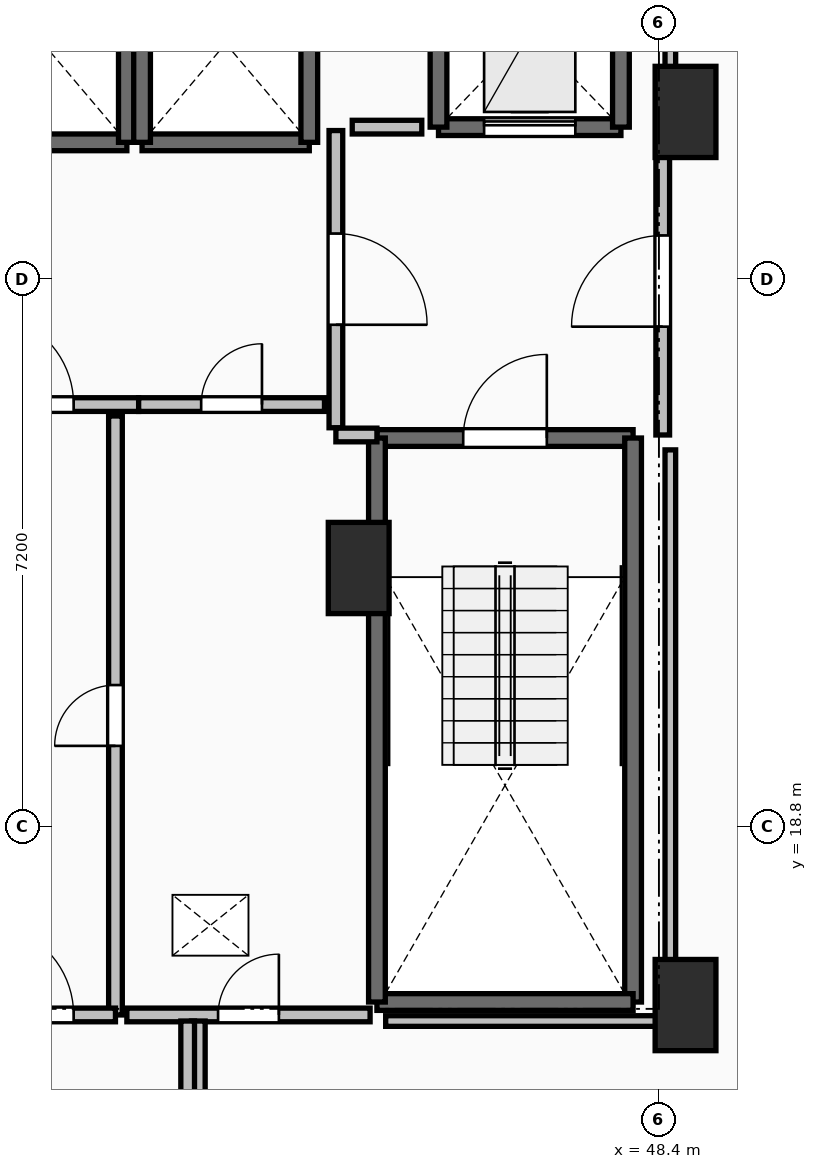
"""IFC4 building model, lengths in metres.
Left out: names, types, materials, properties, quantities, classifications, styles, units other than length and angle.
Written with IfcOpenShell. Run it as: python <this file> out.ifc"""

import sys

from ifc_helpers import new_model, si_unit, direction, frame, frame_2d, origin, origin_2d, place, context, subcontext, project, spatial, rectangle, extrude, element, fill, save


model = new_model("IFC4")
c1 = context("Model", 3, precision=1e-05, world=origin(), true_north=direction((0.0, 1.0)))
c2 = subcontext(c1, "Body", "Model", "MODEL_VIEW")
j1 = project(units=[si_unit("LENGTHUNIT", "METRE"), si_unit("PLANEANGLEUNIT", "RADIAN")], contexts=[c1])
p1 = place(None, origin())
s1 = spatial("IfcSite", under=j1, at=p1, CompositionType="ELEMENT")
p2 = place(p1, origin())
s2 = spatial("IfcBuilding", under=s1, at=p2, CompositionType="ELEMENT")
p3 = place(p2, frame((0.0, 0.0, 117.3)))
s3 = spatial("IfcBuildingStorey", under=s2, at=p3, CompositionType="ELEMENT", Elevation=117.3)
for number, where, z_axis, x_axis in (
    (1, (48.75, 28.2, 0.0), (0.0, 0.0, 1.0), (1.0, 0.0, 0.0)),
    (2, (48.75, 16.45, 0.0), (0.0, 0.0, 1.0), (1.0, 0.0, 0.0)),
    (3, (44.45, 22.2, 0.0), (0.0, 0.0, 1.0), (1.0, 0.0, 0.0)),
):
    element("IfcColumn", number, at=place(p3, frame(where, z_axis=z_axis, x_axis=x_axis)), inside=s3, PredefinedType="PILASTER", context=c2, shape_type="SweptSolid", body=[
        extrude(rectangle(XDim=0.8, YDim=1.2, at=origin_2d()), origin(), (0.0, 0.0, 1.0), 3.5),
    ])
p4 = place(p3, frame((44.69, 23.91, 0.0), z_axis=(0.0, 0.0, 1.0), x_axis=(1.0, 0.0, 0.0)))
e4 = element("IfcWall", 4, at=p4, inside=s3, PredefinedType="SOLIDWALL", context=c2, shape_type="SweptSolid", body=[
    extrude(rectangle(XDim=3.37, YDim=0.22, at=frame_2d((1.685, 0.0))), origin(), (0.0, 0.0, 1.0), 3.24),
])
p5 = place(p4, frame((1.135, 0.0, 0.0)))
e5 = element("IfcOpeningElement", 5, at=p5, cuts=e4, PredefinedType="OPENING", context=c2, shape_type="SweptSolid", body=[
    extrude(rectangle(XDim=1.1, YDim=2.15, at=frame_2d((0.55, 1.075))), frame((0.0, 0.125, 0.0), z_axis=(0.0, -1.0, 0.0), x_axis=(1.0, 0.0, 0.0)), (0.0, 0.0, 1.0), 0.25),
])
p6 = place(p3, frame((48.06, 23.91, 0.0), z_axis=(0.0, 0.0, 1.0), x_axis=(0.0, -1.0, 0.0)))
e6 = element("IfcWall", 6, at=p6, inside=s3, PredefinedType="SOLIDWALL", context=c2, shape_type="SweptSolid", body=[
    extrude(rectangle(XDim=7.42, YDim=0.22, at=frame_2d((3.71, 0.0))), origin(), (0.0, 0.0, 1.0), 3.24),
])
p7 = place(p3, frame((48.06, 16.49, 0.0), z_axis=(0.0, 0.0, 1.0), x_axis=(-1.0, 0.0, 0.0)))
e7 = element("IfcWall", 7, at=p7, inside=s3, PredefinedType="SOLIDWALL", context=c2, shape_type="SweptSolid", body=[
    extrude(rectangle(XDim=3.37, YDim=0.22, at=frame_2d((1.685, 0.0))), origin(), (0.0, 0.0, 1.0), 3.24),
])
p8 = place(p3, frame((44.69, 16.49, 0.0), z_axis=(0.0, 0.0, 1.0), x_axis=(0.0, 1.0, 0.0)))
e8 = element("IfcWall", 8, at=p8, inside=s3, PredefinedType="SOLIDWALL", context=c2, shape_type="SweptSolid", body=[
    extrude(rectangle(XDim=7.42, YDim=0.22, at=frame_2d((3.71, 0.0))), origin(), (0.0, 0.0, 1.0), 3.24),
])
p9 = place(p3, frame((39.2, 27.8, 0.0), z_axis=(0.0, 0.0, 1.0), x_axis=(1.0, 0.0, 0.0)))
e9 = element("IfcWall", 9, at=p9, inside=s3, PredefinedType="SOLIDWALL", context=c2, shape_type="SweptSolid", body=[
    extrude(rectangle(XDim=2.2, YDim=0.22, at=frame_2d((1.1, 0.0))), origin(), (0.0, 0.0, 1.0), 3.24),
])
p10 = place(p3, frame((41.4, 27.8, 0.0), z_axis=(0.0, 0.0, 1.0), x_axis=(0.0, 1.0, 0.0)))
e10 = element("IfcWall", 10, at=p10, inside=s3, PredefinedType="SOLIDWALL", context=c2, shape_type="SweptSolid", body=[
    extrude(rectangle(XDim=2.6, YDim=0.22, at=frame_2d((1.3, 0.0))), origin(), (0.0, 0.0, 1.0), 3.24),
])
p11 = place(p3, frame((41.6, 27.8, 0.0), z_axis=(0.0, 0.0, 1.0), x_axis=(1.0, 0.0, 0.0)))
e11 = element("IfcWall", 11, at=p11, inside=s3, PredefinedType="SOLIDWALL", context=c2, shape_type="SweptSolid", body=[
    extrude(rectangle(XDim=2.2, YDim=0.22, at=frame_2d((1.1, 0.0))), origin(), (0.0, 0.0, 1.0), 3.24),
])
for number, where, z_axis, x_axis in (
    (12, (43.8, 27.8, 0.0), (0.0, 0.0, 1.0), (0.0, 1.0, 0.0)),
    (13, (41.6, 30.4, 0.0), (0.0, 0.0, 1.0), (0.0, -1.0, 0.0)),
):
    element("IfcWall", number, at=place(p3, frame(where, z_axis=z_axis, x_axis=x_axis)), inside=s3, PredefinedType="SOLIDWALL", context=c2, shape_type="SweptSolid", body=[
        extrude(rectangle(XDim=2.6, YDim=0.22, at=frame_2d((1.3, 0.0))), origin(), (0.0, 0.0, 1.0), 3.24),
    ])
p12 = place(p3, frame((45.5, 28.0, 0.0), z_axis=(0.0, 0.0, 1.0), x_axis=(1.0, 0.0, 0.0)))
e14 = element("IfcWall", 14, at=p12, inside=s3, PredefinedType="SHEAR", context=c2, shape_type="SweptSolid", body=[
    extrude(rectangle(XDim=2.4, YDim=0.22, at=frame_2d((1.2, 0.0))), origin(), (0.0, 0.0, 1.0), 3.24),
])
p13 = place(p12, frame((0.6, 0.0, 0.0)))
e15 = element("IfcOpeningElement", 15, at=p13, cuts=e14, PredefinedType="OPENING", context=c2, shape_type="SweptSolid", body=[
    extrude(rectangle(XDim=1.2, YDim=2.2, at=frame_2d((0.6, 1.1))), frame((0.0, 0.125, 0.0), z_axis=(0.0, -1.0, 0.0), x_axis=(1.0, 0.0, 0.0)), (0.0, 0.0, 1.0), 0.25),
])
for number, where, z_axis, x_axis in (
    (16, (47.9, 28.0, 0.0), (0.0, 0.0, 1.0), (0.0, 1.0, 0.0)),
    (17, (45.5, 30.5, 0.0), (0.0, 0.0, 1.0), (0.0, -1.0, 0.0)),
):
    element("IfcWall", number, at=place(p3, frame(where, z_axis=z_axis, x_axis=x_axis)), inside=s3, PredefinedType="SHEAR", context=c2, shape_type="SweptSolid", body=[
        extrude(rectangle(XDim=2.5, YDim=0.22, at=frame_2d((1.25, 0.0))), origin(), (0.0, 0.0, 1.0), 3.24),
    ])
p14 = place(p3, frame((44.15, 27.955, 0.0), z_axis=(0.0, 0.0, 1.0), x_axis=(0.0, -1.0, 0.0)))
e18 = element("IfcWall", 18, at=p14, inside=s3, PredefinedType="PARTITIONING", context=c2, shape_type="SweptSolid", body=[
    extrude(rectangle(XDim=3.91, YDim=0.18, at=frame_2d((1.955, 0.0))), origin(), (0.0, 0.0, 1.0), 3.24),
])
p15 = place(p14, frame((1.355, 0.0, 0.0)))
e19 = element("IfcOpeningElement", 19, at=p15, cuts=e18, PredefinedType="OPENING", context=c2, shape_type="SweptSolid", body=[
    extrude(rectangle(XDim=1.2, YDim=2.15, at=frame_2d((0.6, 1.075))), frame((0.0, 0.105, 0.0), z_axis=(0.0, -1.0, 0.0), x_axis=(1.0, 0.0, 0.0)), (0.0, 0.0, 1.0), 0.21),
])
p16 = place(p3, frame((44.15, 23.95, 0.0), z_axis=(0.0, 0.0, 1.0), x_axis=(1.0, 0.0, 0.0)))
e20 = element("IfcWall", 20, at=p16, inside=s3, PredefinedType="PARTITIONING", context=c2, shape_type="SweptSolid", body=[
    extrude(rectangle(XDim=0.54, YDim=0.18, at=frame_2d((0.27, 0.0))), origin(), (0.0, 0.0, 1.0), 3.24),
])
p17 = place(p3, frame((48.45, 23.95, 0.0), z_axis=(0.0, 0.0, 1.0), x_axis=(0.0, 1.0, 0.0)))
e21 = element("IfcWall", 21, at=p17, inside=s3, PredefinedType="PARTITIONING", context=c2, shape_type="SweptSolid", body=[
    extrude(rectangle(XDim=4.05, YDim=0.18, at=frame_2d((2.025, 0.0))), origin(), (0.0, 0.0, 1.0), 3.24),
])
p18 = place(p17, frame((1.425, 0.0, 0.0)))
e22 = element("IfcOpeningElement", 22, at=p18, cuts=e21, PredefinedType="OPENING", context=c2, shape_type="SweptSolid", body=[
    extrude(rectangle(XDim=1.2, YDim=2.15, at=frame_2d((0.6, 1.075))), frame((0.0, 0.105, 0.0), z_axis=(0.0, -1.0, 0.0), x_axis=(1.0, 0.0, 0.0)), (0.0, 0.0, 1.0), 0.21),
])
p19 = place(p3, frame((38.645, 24.35, 0.0), z_axis=(0.0, 0.0, 1.0), x_axis=(1.0, 0.0, 0.0)))
e23 = element("IfcWall", 23, at=p19, inside=s3, PredefinedType="PARTITIONING", context=c2, shape_type="SweptSolid", body=[
    extrude(rectangle(XDim=2.91, YDim=0.18, at=frame_2d((1.455, 0.0))), origin(), (0.0, 0.0, 1.0), 3.24),
])
p20 = place(p19, frame((0.855, 0.0, 0.0)))
e24 = element("IfcOpeningElement", 24, at=p20, cuts=e23, PredefinedType="OPENING", context=c2, shape_type="SweptSolid", body=[
    extrude(rectangle(XDim=1.2, YDim=2.15, at=frame_2d((0.6, 1.075))), frame((0.0, 0.105, 0.0), z_axis=(0.0, -1.0, 0.0), x_axis=(1.0, 0.0, 0.0)), (0.0, 0.0, 1.0), 0.21),
])
p21 = place(p3, frame((41.555, 24.35, 0.0), z_axis=(0.0, 0.0, 1.0), x_axis=(1.0, 0.0, 0.0)))
e25 = element("IfcWall", 25, at=p21, inside=s3, PredefinedType="PARTITIONING", context=c2, shape_type="SweptSolid", body=[
    extrude(rectangle(XDim=2.445, YDim=0.18, at=frame_2d((1.223, 0.0))), origin(), (0.0, 0.0, 1.0), 3.24),
])
p22 = place(p21, frame((0.823, 0.0, 0.0)))
e26 = element("IfcOpeningElement", 26, at=p22, cuts=e25, PredefinedType="OPENING", context=c2, shape_type="SweptSolid", body=[
    extrude(rectangle(XDim=0.8, YDim=2.05, at=frame_2d((0.4, 1.025))), frame((0.0, 0.105, 0.0), z_axis=(0.0, -1.0, 0.0), x_axis=(1.0, 0.0, 0.0)), (0.0, 0.0, 1.0), 0.21),
])
p23 = place(p3, frame((41.25, 16.32, 0.0), z_axis=(0.0, 0.0, 1.0), x_axis=(0.0, 1.0, 0.0)))
e27 = element("IfcWall", 27, at=p23, inside=s3, PredefinedType="PARTITIONING", context=c2, shape_type="SweptSolid", body=[
    extrude(rectangle(XDim=7.88, YDim=0.18, at=frame_2d((3.94, 0.0))), origin(), (0.0, 0.0, 1.0), 3.24),
])
p24 = place(p23, frame((3.54, 0.0, 0.0)))
e28 = element("IfcOpeningElement", 28, at=p24, cuts=e27, PredefinedType="OPENING", context=c2, shape_type="SweptSolid", body=[
    extrude(rectangle(XDim=0.8, YDim=2.05, at=frame_2d((0.4, 1.025))), frame((0.0, 0.105, 0.0), z_axis=(0.0, -1.0, 0.0), x_axis=(1.0, 0.0, 0.0)), (0.0, 0.0, 1.0), 0.21),
])
p25 = place(p3, frame((38.95, 16.32, 0.0), z_axis=(0.0, 0.0, 1.0), x_axis=(1.0, 0.0, 0.0)))
e29 = element("IfcWall", 29, at=p25, inside=s3, PredefinedType="PARTITIONING", context=c2, shape_type="SweptSolid", body=[
    extrude(rectangle(XDim=2.3, YDim=0.18, at=frame_2d((1.15, 0.0))), origin(), (0.0, 0.0, 1.0), 3.24),
])
p26 = place(p25, frame((0.55, 0.0, 0.0)))
e30 = element("IfcOpeningElement", 30, at=p26, cuts=e29, PredefinedType="OPENING", context=c2, shape_type="SweptSolid", body=[
    extrude(rectangle(XDim=1.2, YDim=2.15, at=frame_2d((0.6, 1.075))), frame((0.0, 0.105, 0.0), z_axis=(0.0, -1.0, 0.0), x_axis=(1.0, 0.0, 0.0)), (0.0, 0.0, 1.0), 0.21),
])
p27 = place(p3, frame((41.4, 16.32, 0.0), z_axis=(0.0, 0.0, 1.0), x_axis=(1.0, 0.0, 0.0)))
e31 = element("IfcWall", 31, at=p27, inside=s3, PredefinedType="PARTITIONING", context=c2, shape_type="SweptSolid", body=[
    extrude(rectangle(XDim=3.2, YDim=0.18, at=frame_2d((1.6, 0.0))), origin(), (0.0, 0.0, 1.0), 3.24),
])
p28 = place(p27, frame((1.2, 0.0, 0.0)))
e32 = element("IfcOpeningElement", 32, at=p28, cuts=e31, PredefinedType="OPENING", context=c2, shape_type="SweptSolid", body=[
    extrude(rectangle(XDim=0.8, YDim=2.05, at=frame_2d((0.4, 1.025))), frame((0.0, 0.105, 0.0), z_axis=(0.0, -1.0, 0.0), x_axis=(1.0, 0.0, 0.0)), (0.0, 0.0, 1.0), 0.21),
])
for number, where, z_axis, x_axis in (
    (33, (42.34, 16.24, 0.0), (0.0, 0.0, 1.0), (0.0, -1.0, 0.0)),
    (34, (42.2, 14.1, 0.0), (0.0, 0.0, 1.0), (0.0, 1.0, 0.0)),
):
    element("IfcWall", number, at=place(p3, frame(where, z_axis=z_axis, x_axis=x_axis)), inside=s3, PredefinedType="PARTITIONING", context=c2, shape_type="SweptSolid", body=[
        extrude(rectangle(XDim=2.14, YDim=0.18, at=frame_2d((1.07, 0.0))), origin(), (0.0, 0.0, 1.0), 2.874),
    ])
p29 = place(p3, frame((45.28, 28.0, 0.0), z_axis=(0.0, 0.0, 1.0), x_axis=(-1.0, 0.0, 0.0)))
e35 = element("IfcWall", 35, at=p29, inside=s3, PredefinedType="PARTITIONING", context=c2, shape_type="SweptSolid", body=[
    extrude(rectangle(XDim=0.915, YDim=0.18, at=frame_2d((0.458, 0.0))), origin(), (0.0, 0.0, 1.0), 3.24),
])
p30 = place(p3, frame((48.55, 33.45, 0.0), z_axis=(0.0, 0.0, 1.0), x_axis=(0.0, -1.0, 0.0)))
e36 = element("IfcWall", 36, at=p30, inside=s3, PredefinedType="PARTITIONING", context=c2, shape_type="SweptSolid", body=[
    extrude(rectangle(XDim=5.254, YDim=0.14, at=frame_2d((2.627, 0.0))), origin(), (0.0, 0.0, 1.0), 2.432),
])
p31 = place(p3, frame((48.55, 23.754, 0.0), z_axis=(0.0, 0.0, 1.0), x_axis=(0.0, -1.0, 0.0)))
e37 = element("IfcWall", 37, at=p31, inside=s3, PredefinedType="PARTITIONING", context=c2, shape_type="SweptSolid", body=[
    extrude(rectangle(XDim=7.514, YDim=0.14, at=frame_2d((3.757, 0.0))), origin(), (0.0, 0.0, 1.0), 2.432),
])
p32 = place(p3, frame((48.55, 16.24, 0.0), z_axis=(0.0, 0.0, 1.0), x_axis=(-1.0, 0.0, 0.0)))
e38 = element("IfcWall", 38, at=p32, inside=s3, PredefinedType="PARTITIONING", context=c2, shape_type="SweptSolid", body=[
    extrude(rectangle(XDim=3.745, YDim=0.14, at=frame_2d((1.873, 0.0))), origin(), (0.0, 0.0, 1.0), 2.432),
])
p33 = place(p5, origin())
e39 = element("IfcDoor", 39, at=p33, inside=s3, OperationType="SINGLE_SWING_RIGHT", PredefinedType="DOOR", context=c2, shape_type="SweptSolid", body=[
    extrude(rectangle(XDim=1.1, YDim=2.15, at=frame_2d((0.55, 1.075))), frame((0.0, 0.025, 0.0), z_axis=(0.0, -1.0, 0.0), x_axis=(1.0, 0.0, 0.0)), (0.0, 0.0, 1.0), 0.05),
])
fill(e5, e39)
p34 = place(p13, origin())
e40 = element("IfcDoor", 40, at=p34, inside=s3, OperationType="SLIDING_TO_LEFT", PredefinedType="DOOR", context=c2, shape_type="SweptSolid", body=[
    extrude(rectangle(XDim=1.2, YDim=2.2, at=frame_2d((0.6, 1.1))), frame((0.0, 0.025, 0.0), z_axis=(0.0, -1.0, 0.0), x_axis=(1.0, 0.0, 0.0)), (0.0, 0.0, 1.0), 0.05),
])
fill(e15, e40)
p35 = place(p15, origin())
e41 = element("IfcDoor", 41, at=p35, inside=s3, OperationType="SINGLE_SWING_RIGHT", PredefinedType="DOOR", context=c2, shape_type="SweptSolid", body=[
    extrude(rectangle(XDim=1.2, YDim=2.15, at=frame_2d((0.6, 1.075))), frame((0.0, 0.025, 0.0), z_axis=(0.0, -1.0, 0.0), x_axis=(1.0, 0.0, 0.0)), (0.0, 0.0, 1.0), 0.05),
])
fill(e19, e41)
p36 = place(p18, origin())
e42 = element("IfcDoor", 42, at=p36, inside=s3, OperationType="SINGLE_SWING_LEFT", PredefinedType="DOOR", context=c2, shape_type="SweptSolid", body=[
    extrude(rectangle(XDim=1.2, YDim=2.15, at=frame_2d((0.6, 1.075))), frame((0.0, 0.025, 0.0), z_axis=(0.0, -1.0, 0.0), x_axis=(1.0, 0.0, 0.0)), (0.0, 0.0, 1.0), 0.05),
])
fill(e22, e42)
p37 = place(p20, origin())
e43 = element("IfcDoor", 43, at=p37, inside=s3, OperationType="SINGLE_SWING_LEFT", PredefinedType="DOOR", context=c2, shape_type="SweptSolid", body=[
    extrude(rectangle(XDim=1.2, YDim=2.15, at=frame_2d((0.6, 1.075))), frame((0.0, 0.025, 0.0), z_axis=(0.0, -1.0, 0.0), x_axis=(1.0, 0.0, 0.0)), (0.0, 0.0, 1.0), 0.05),
])
fill(e24, e43)
p38 = place(p22, origin())
e44 = element("IfcDoor", 44, at=p38, inside=s3, OperationType="SINGLE_SWING_RIGHT", PredefinedType="DOOR", context=c2, shape_type="SweptSolid", body=[
    extrude(rectangle(XDim=0.8, YDim=2.05, at=frame_2d((0.4, 1.025))), frame((0.0, 0.025, 0.0), z_axis=(0.0, -1.0, 0.0), x_axis=(1.0, 0.0, 0.0)), (0.0, 0.0, 1.0), 0.05),
])
fill(e26, e44)
p39 = place(p24, origin())
e45 = element("IfcDoor", 45, at=p39, inside=s3, OperationType="SINGLE_SWING_LEFT", PredefinedType="DOOR", context=c2, shape_type="SweptSolid", body=[
    extrude(rectangle(XDim=0.8, YDim=2.05, at=frame_2d((0.4, 1.025))), frame((0.0, 0.025, 0.0), z_axis=(0.0, -1.0, 0.0), x_axis=(1.0, 0.0, 0.0)), (0.0, 0.0, 1.0), 0.05),
])
fill(e28, e45)
p40 = place(p26, origin())
e46 = element("IfcDoor", 46, at=p40, inside=s3, OperationType="SINGLE_SWING_LEFT", PredefinedType="DOOR", context=c2, shape_type="SweptSolid", body=[
    extrude(rectangle(XDim=1.2, YDim=2.15, at=frame_2d((0.6, 1.075))), frame((0.0, 0.025, 0.0), z_axis=(0.0, -1.0, 0.0), x_axis=(1.0, 0.0, 0.0)), (0.0, 0.0, 1.0), 0.05),
])
fill(e30, e46)
p41 = place(p28, origin())
e47 = element("IfcDoor", 47, at=p41, inside=s3, OperationType="SINGLE_SWING_RIGHT", PredefinedType="DOOR", context=c2, shape_type="SweptSolid", body=[
    extrude(rectangle(XDim=0.8, YDim=2.05, at=frame_2d((0.4, 1.025))), frame((0.0, 0.025, 0.0), z_axis=(0.0, -1.0, 0.0), x_axis=(1.0, 0.0, 0.0)), (0.0, 0.0, 1.0), 0.05),
])
fill(e32, e47)
save(model, sys.argv[1])
